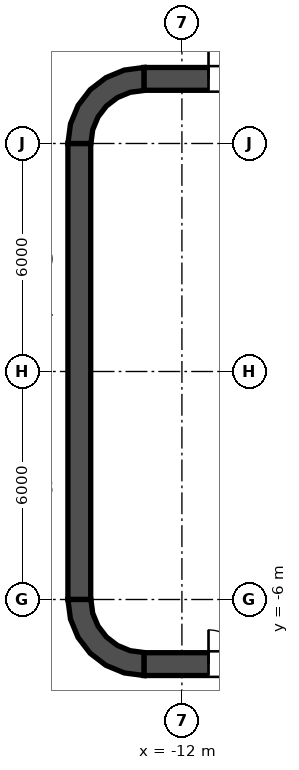
"""IFC4 building model, lengths in metres.
Left out: names, types, materials, properties, quantities, classifications, styles, units other than length and angle.
Written with IfcOpenShell. Run it as: python <this file> out.ifc"""

import sys

from ifc_helpers import new_model, si_unit, direction, frame, frame_2d, origin, place, context, subcontext, project, spatial, polyline, rectangle, outline, extrude, element, fill, save


model = new_model("IFC4")
c1 = context("Model", 3, precision=1e-05, world=origin(), true_north=direction((0.0, 1.0)))
c2 = subcontext(c1, "Body", "Model", "MODEL_VIEW")
j1 = project(units=[si_unit("LENGTHUNIT", "METRE"), si_unit("PLANEANGLEUNIT", "RADIAN")], contexts=[c1])
p1 = place(None, origin())
s1 = spatial("IfcSite", under=j1, at=p1, CompositionType="ELEMENT")
p2 = place(p1, origin())
s2 = spatial("IfcBuilding", under=s1, at=p2, CompositionType="ELEMENT")
p3 = place(p2, frame((0.0, 0.0, 37.4)))
s3 = spatial("IfcBuildingStorey", under=s2, at=p3, CompositionType="ELEMENT", Elevation=37.4)
p4 = place(p3, frame((-13.0, 7.7, 0.0), z_axis=(0.0, 0.0, 1.0), x_axis=(1.0, 0.0, 0.0)))
e1 = element("IfcWall", 1, at=p4, inside=s3, PredefinedType="SHEAR", context=c2, shape_type="SweptSolid", body=[
    extrude(rectangle(XDim=26.0, YDim=0.6, at=frame_2d((13.0, 0.0))), origin(), (0.0, 0.0, 1.0), 6.6),
])
p5 = place(p4, frame((1.7, 0.0, 0.0)))
e2 = element("IfcOpeningElement", 2, at=p5, cuts=e1, PredefinedType="OPENING", context=c2, shape_type="SweptSolid", body=[
    extrude(rectangle(XDim=1.8, YDim=2.1, at=frame_2d((0.9, 1.05))), frame((0.0, 0.3, 0.0), z_axis=(0.0, -1.0, 0.0), x_axis=(1.0, 0.0, 0.0)), (0.0, 0.0, 1.0), 0.6),
])
p6 = place(p4, frame((22.5, 0.0, 0.0)))
e3 = element("IfcOpeningElement", 3, at=p6, cuts=e1, PredefinedType="OPENING", context=c2, shape_type="SweptSolid", body=[
    extrude(rectangle(XDim=1.8, YDim=2.1, at=frame_2d((0.9, 1.05))), frame((0.0, 0.3, 0.0), z_axis=(0.0, -1.0, 0.0), x_axis=(1.0, 0.0, 0.0)), (0.0, 0.0, 1.0), 0.6),
])
p7 = place(p3, frame((-13.0, -7.7, 0.0), z_axis=(0.0, 0.0, 1.0), x_axis=(1.0, 0.0, 0.0)))
e4 = element("IfcWall", 4, at=p7, inside=s3, PredefinedType="SHEAR", context=c2, shape_type="SweptSolid", body=[
    extrude(rectangle(XDim=26.0, YDim=0.6, at=frame_2d((13.0, 0.0))), origin(), (0.0, 0.0, 1.0), 6.6),
])
p8 = place(p7, frame((1.7, 0.0, 0.0)))
e5 = element("IfcOpeningElement", 5, at=p8, cuts=e4, PredefinedType="OPENING", context=c2, shape_type="SweptSolid", body=[
    extrude(rectangle(XDim=1.8, YDim=2.1, at=frame_2d((0.9, 1.05))), frame((0.0, 0.3, 0.0), z_axis=(0.0, -1.0, 0.0), x_axis=(1.0, 0.0, 0.0)), (0.0, 0.0, 1.0), 0.6),
])
p9 = place(p7, frame((22.5, 0.0, 0.0)))
e6 = element("IfcOpeningElement", 6, at=p9, cuts=e4, PredefinedType="OPENING", context=c2, shape_type="SweptSolid", body=[
    extrude(rectangle(XDim=1.8, YDim=2.1, at=frame_2d((0.9, 1.05))), frame((0.0, 0.3, 0.0), z_axis=(0.0, -1.0, 0.0), x_axis=(1.0, 0.0, 0.0)), (0.0, 0.0, 1.0), 0.6),
])
p10 = place(p3, frame((-14.7, -6.0, 0.0), z_axis=(0.0, 0.0, 1.0), x_axis=(0.0, 1.0, 0.0)))
e7 = element("IfcWall", 7, at=p10, inside=s3, PredefinedType="SHEAR", context=c2, shape_type="SweptSolid", body=[
    extrude(rectangle(XDim=12.0, YDim=0.6, at=frame_2d((6.0, 0.0))), origin(), (0.0, 0.0, 1.0), 6.6),
])
p11 = place(p3, origin())
e8 = element("IfcWall", 8, at=p11, inside=s3, PredefinedType="SHEAR", context=c2, shape_type="SweptSolid", body=[
    extrude(outline(polyline([(-15.0, 6.0), (-14.395, 6.0), (-14.347, 6.361), (-14.208, 6.698), (-13.986, 6.986), (-13.698, 7.208), (-13.361, 7.347), (-13.0, 7.395), (-13.0, 8.0), (-13.518, 7.932), (-14.0, 7.732), (-14.414, 7.414), (-14.732, 7.0), (-14.932, 6.518), (-15.0, 6.0)])), origin(), (0.0, 0.0, 1.0), 6.6),
])
e9 = element("IfcWall", 9, at=p11, inside=s3, PredefinedType="SHEAR", context=c2, shape_type="SweptSolid", body=[
    extrude(outline(polyline([(-13.0, -8.0), (-13.0, -7.395), (-13.361, -7.347), (-13.698, -7.208), (-13.986, -6.986), (-14.208, -6.698), (-14.347, -6.361), (-14.395, -6.0), (-15.0, -6.0), (-14.932, -6.518), (-14.732, -7.0), (-14.414, -7.414), (-14.0, -7.732), (-13.518, -7.932), (-13.0, -8.0)])), origin(), (0.0, 0.0, 1.0), 6.6),
])
p12 = place(p3, frame((-11.8, -7.4, 0.0), z_axis=(0.0, 0.0, 1.0), x_axis=(0.0, 1.0, 0.0)))
e10 = element("IfcWall", 10, at=p12, inside=s3, PredefinedType="SOLIDWALL", context=c2, shape_type="SweptSolid", body=[
    extrude(rectangle(XDim=14.8, YDim=0.4, at=frame_2d((7.4, 0.0))), origin(), (0.0, 0.0, 1.0), 6.25),
])
p13 = place(p12, frame((11.2, 0.0, 0.0)))
e11 = element("IfcOpeningElement", 11, at=p13, cuts=e10, PredefinedType="OPENING", context=c2, shape_type="SweptSolid", body=[
    extrude(rectangle(XDim=1.1, YDim=2.1, at=frame_2d((0.55, 1.05))), frame((0.0, 0.2, 0.0), z_axis=(0.0, -1.0, 0.0), x_axis=(1.0, 0.0, 0.0)), (0.0, 0.0, 1.0), 0.4),
])
p14 = place(p12, frame((8.3, 0.0, 0.0)))
e12 = element("IfcOpeningElement", 12, at=p14, cuts=e10, PredefinedType="OPENING", context=c2, shape_type="SweptSolid", body=[
    extrude(rectangle(XDim=1.1, YDim=2.1, at=frame_2d((0.55, 1.05))), frame((0.0, 0.2, 0.0), z_axis=(0.0, -1.0, 0.0), x_axis=(1.0, 0.0, 0.0)), (0.0, 0.0, 1.0), 0.4),
])
p15 = place(p12, frame((5.4, 0.0, 0.0)))
e13 = element("IfcOpeningElement", 13, at=p15, cuts=e10, PredefinedType="OPENING", context=c2, shape_type="SweptSolid", body=[
    extrude(rectangle(XDim=1.1, YDim=2.1, at=frame_2d((0.55, 1.05))), frame((0.0, 0.2, 0.0), z_axis=(0.0, -1.0, 0.0), x_axis=(1.0, 0.0, 0.0)), (0.0, 0.0, 1.0), 0.4),
])
p16 = place(p12, frame((13.552, 0.0, 0.0)))
e14 = element("IfcOpeningElement", 14, at=p16, cuts=e10, PredefinedType="OPENING", context=c2, shape_type="SweptSolid", body=[
    extrude(rectangle(XDim=0.9, YDim=2.1, at=frame_2d((0.45, 1.05))), frame((0.0, 0.2, 0.0), z_axis=(0.0, -1.0, 0.0), x_axis=(1.0, 0.0, 0.0)), (0.0, 0.0, 1.0), 0.4),
])
p17 = place(p12, frame((0.347, 0.0, 0.0)))
e15 = element("IfcOpeningElement", 15, at=p17, cuts=e10, PredefinedType="OPENING", context=c2, shape_type="SweptSolid", body=[
    extrude(rectangle(XDim=0.9, YDim=2.1, at=frame_2d((0.45, 1.05))), frame((0.0, 0.2, 0.0), z_axis=(0.0, -1.0, 0.0), x_axis=(1.0, 0.0, 0.0)), (0.0, 0.0, 1.0), 0.4),
])
e16 = element("IfcWall", 16, at=p11, inside=s3, PredefinedType="SOLIDWALL", context=c2, shape_type="SweptSolid", body=[
    extrude(outline(polyline([(-12.0, -5.925), (-12.0, -5.675), (-14.15, -5.675), (-14.15, -3.025), (-12.0, -3.025), (-12.0, -2.775), (-14.15, -2.775), (-14.15, -0.125), (-12.0, -0.125), (-12.0, 0.125), (-14.15, 0.125), (-14.15, 2.775), (-12.0, 2.775), (-12.0, 3.025), (-14.15, 3.025), (-14.15, 5.675), (-12.0, 5.675), (-12.0, 5.925), (-14.15, 5.925), (-14.4, 5.925), (-14.4, 5.675), (-14.4, 3.025), (-14.4, 2.775), (-14.4, 0.125), (-14.4, -0.125), (-14.4, -2.775), (-14.4, -3.025), (-14.4, -5.675), (-14.4, -5.925), (-14.15, -5.925), (-12.0, -5.925)])), origin(), (0.0, 0.0, 1.0), 6.25),
])
p18 = place(p13, origin())
e17 = element("IfcDoor", 17, at=p18, inside=s3, OperationType="DOUBLE_DOOR_SLIDING", PredefinedType="DOOR", context=c2, shape_type="SweptSolid", body=[
    extrude(rectangle(XDim=1.1, YDim=2.1, at=frame_2d((0.55, 1.05))), frame((0.0, 0.025, 0.0), z_axis=(0.0, -1.0, 0.0), x_axis=(1.0, 0.0, 0.0)), (0.0, 0.0, 1.0), 0.05),
])
fill(e11, e17)
p19 = place(p14, origin())
e18 = element("IfcDoor", 18, at=p19, inside=s3, OperationType="DOUBLE_DOOR_SLIDING", PredefinedType="DOOR", context=c2, shape_type="SweptSolid", body=[
    extrude(rectangle(XDim=1.1, YDim=2.1, at=frame_2d((0.55, 1.05))), frame((0.0, 0.025, 0.0), z_axis=(0.0, -1.0, 0.0), x_axis=(1.0, 0.0, 0.0)), (0.0, 0.0, 1.0), 0.05),
])
fill(e12, e18)
p20 = place(p15, origin())
e19 = element("IfcDoor", 19, at=p20, inside=s3, OperationType="DOUBLE_DOOR_SLIDING", PredefinedType="DOOR", context=c2, shape_type="SweptSolid", body=[
    extrude(rectangle(XDim=1.1, YDim=2.1, at=frame_2d((0.55, 1.05))), frame((0.0, 0.025, 0.0), z_axis=(0.0, -1.0, 0.0), x_axis=(1.0, 0.0, 0.0)), (0.0, 0.0, 1.0), 0.05),
])
fill(e13, e19)
p21 = place(p16, origin())
e20 = element("IfcDoor", 20, at=p21, inside=s3, OperationType="SINGLE_SWING_LEFT", PredefinedType="DOOR", context=c2, shape_type="SweptSolid", body=[
    extrude(rectangle(XDim=0.9, YDim=2.1, at=frame_2d((0.45, 1.05))), frame((0.0, 0.025, 0.0), z_axis=(0.0, -1.0, 0.0), x_axis=(1.0, 0.0, 0.0)), (0.0, 0.0, 1.0), 0.05),
])
fill(e14, e20)
p22 = place(p17, origin())
e21 = element("IfcDoor", 21, at=p22, inside=s3, OperationType="SINGLE_SWING_LEFT", PredefinedType="DOOR", context=c2, shape_type="SweptSolid", body=[
    extrude(rectangle(XDim=0.9, YDim=2.1, at=frame_2d((0.45, 1.05))), frame((0.0, 0.025, 0.0), z_axis=(0.0, -1.0, 0.0), x_axis=(1.0, 0.0, 0.0)), (0.0, 0.0, 1.0), 0.05),
])
fill(e15, e21)
p23 = place(p5, origin())
e22 = element("IfcDoor", 22, at=p23, inside=s3, OperationType="DOUBLE_DOOR_SINGLE_SWING", PredefinedType="DOOR", context=c2, shape_type="SweptSolid", body=[
    extrude(rectangle(XDim=1.8, YDim=2.1, at=frame_2d((0.9, 1.05))), frame((0.0, 0.025, 0.0), z_axis=(0.0, -1.0, 0.0), x_axis=(1.0, 0.0, 0.0)), (0.0, 0.0, 1.0), 0.05),
])
fill(e2, e22)
p24 = place(p8, origin())
e23 = element("IfcDoor", 23, at=p24, inside=s3, OperationType="DOUBLE_DOOR_SINGLE_SWING", PredefinedType="DOOR", context=c2, shape_type="SweptSolid", body=[
    extrude(rectangle(XDim=1.8, YDim=2.1, at=frame_2d((0.9, 1.05))), frame((0.0, 0.025, 0.0), z_axis=(0.0, -1.0, 0.0), x_axis=(1.0, 0.0, 0.0)), (0.0, 0.0, 1.0), 0.05),
])
fill(e5, e23)
save(model, sys.argv[1])
